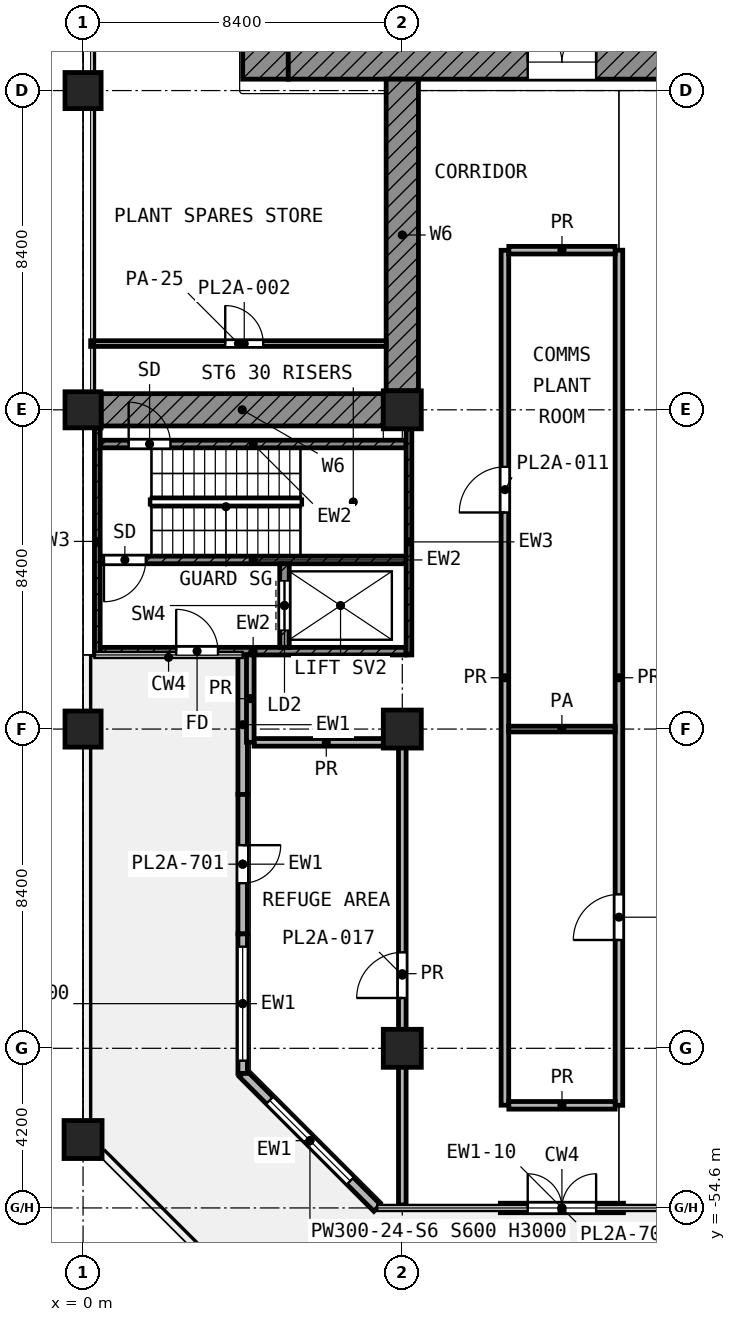
"""IFC4 building model, lengths in metres.
Left out: names, types, materials, properties, quantities, classifications, styles, units other than length and angle.
Written with IfcOpenShell. Run it as: python <this file> out.ifc"""

import sys

from ifc_helpers import new_model, si_unit, direction, frame, frame_2d, origin, origin_2d, place, context, subcontext, project, spatial, rectangle, extrude, element, fill, save


model = new_model("IFC4")
c1 = context("Model", 3, precision=1e-05, world=origin(), true_north=direction((0.0, 1.0)))
c2 = subcontext(c1, "Body", "Model", "MODEL_VIEW")
j1 = project(units=[si_unit("LENGTHUNIT", "METRE"), si_unit("PLANEANGLEUNIT", "RADIAN")], contexts=[c1])
p1 = place(None, origin())
s1 = spatial("IfcSite", under=j1, at=p1, CompositionType="ELEMENT")
p2 = place(p1, origin())
s2 = spatial("IfcBuilding", under=s1, at=p2, CompositionType="ELEMENT")
p3 = place(p2, frame((0.0, 0.0, 153.4)))
s3 = spatial("IfcBuildingStorey", under=s2, at=p3, CompositionType="ELEMENT", Elevation=153.4)
for number, where, z_axis, x_axis in (
    (1, (0.0, -25.2, 0.0), (0.0, 0.0, 1.0), (1.0, 0.0, 0.0)),
    (2, (0.0, -33.6, 0.0), (0.0, 0.0, 1.0), (1.0, 0.0, 0.0)),
):
    element("IfcColumn", number, at=place(p3, frame(where, z_axis=z_axis, x_axis=x_axis)), inside=s3, PredefinedType="COLUMN", context=c2, shape_type="SweptSolid", body=[
        extrude(rectangle(XDim=0.95, YDim=0.95, at=origin_2d()), origin(), (0.0, 0.0, 1.0), 5.0),
    ])
p4 = place(p3, frame((8.4, -33.6, 0.0), z_axis=(0.0, 0.0, 1.0), x_axis=(1.0, 0.0, 0.0)))
e3 = element("IfcColumn", 3, at=p4, inside=s3, PredefinedType="COLUMN", context=c2, shape_type="SweptSolid", body=[
    extrude(rectangle(XDim=1.0, YDim=1.0, at=origin_2d()), origin(), (0.0, 0.0, 1.0), 5.0),
])
p5 = place(p3, frame((0.0, -42.0, 0.0), z_axis=(0.0, 0.0, 1.0), x_axis=(1.0, 0.0, 0.0)))
e4 = element("IfcColumn", 4, at=p5, inside=s3, PredefinedType="COLUMN", context=c2, shape_type="SweptSolid", body=[
    extrude(rectangle(XDim=0.95, YDim=0.95, at=origin_2d()), origin(), (0.0, 0.0, 1.0), 5.0),
])
for number, where, z_axis, x_axis in (
    (5, (8.4, -42.0, 0.0), (0.0, 0.0, 1.0), (1.0, 0.0, 0.0)),
    (6, (8.4, -50.4, 0.0), (0.0, 0.0, 1.0), (1.0, 0.0, 0.0)),
    (7, (0.0, -52.8, 0.0), (0.0, 0.0, 1.0), (1.0, 0.0, 0.0)),
):
    element("IfcColumn", number, at=place(p3, frame(where, z_axis=z_axis, x_axis=x_axis)), inside=s3, PredefinedType="COLUMN", context=c2, shape_type="SweptSolid", body=[
        extrude(rectangle(XDim=1.0, YDim=1.0, at=origin_2d()), origin(), (0.0, 0.0, 1.0), 5.0),
    ])
p6 = place(p3, frame((8.4, -24.9, 0.0), z_axis=(0.0, 0.0, 1.0), x_axis=(0.0, -1.0, 0.0)))
e8 = element("IfcWall", 8, at=p6, inside=s3, PredefinedType="SHEAR", context=c2, shape_type="SweptSolid", body=[
    extrude(rectangle(XDim=8.2, YDim=0.85, at=frame_2d((4.1, 0.0))), origin(), (0.0, 0.0, 1.0), 4.4),
])
p7 = place(p3, frame((0.475, -33.6, 0.0), z_axis=(0.0, 0.0, 1.0), x_axis=(1.0, 0.0, 0.0)))
e9 = element("IfcWall", 9, at=p7, inside=s3, PredefinedType="SHEAR", context=c2, shape_type="SweptSolid", body=[
    extrude(rectangle(XDim=7.425, YDim=0.85, at=frame_2d((3.712, 0.0))), origin(), (0.0, 0.0, 1.0), 4.4),
])
p8 = place(p3, frame((4.2, -40.05, 0.0), z_axis=(0.0, 0.0, 1.0), x_axis=(0.0, -1.0, 0.0)))
e10 = element("IfcWall", 10, at=p8, inside=s3, PredefinedType="SOLIDWALL", context=c2, shape_type="SweptSolid", body=[
    extrude(rectangle(XDim=3.67, YDim=0.25, at=frame_2d((1.835, 0.0))), origin(), (0.0, 0.0, 1.0), 4.4),
])
p9 = place(p3, frame((4.2, -43.72, 0.0), z_axis=(0.0, 0.0, 1.0), x_axis=(0.0, -1.0, 0.0)))
e11 = element("IfcWall", 11, at=p9, inside=s3, PredefinedType="SOLIDWALL", context=c2, shape_type="SweptSolid", body=[
    extrude(rectangle(XDim=3.67, YDim=0.25, at=frame_2d((1.835, 0.0))), origin(), (0.0, 0.0, 1.0), 4.4),
])
p10 = place(p9, frame((1.335, 0.0, 0.0)))
e12 = element("IfcOpeningElement", 12, at=p10, cuts=e11, PredefinedType="OPENING", context=c2, shape_type="SweptSolid", body=[
    extrude(rectangle(XDim=1.0, YDim=2.1, at=frame_2d((0.5, 1.05))), frame((0.0, 0.135, 0.0), z_axis=(0.0, -1.0, 0.0), x_axis=(1.0, 0.0, 0.0)), (0.0, 0.0, 1.0), 0.27),
])
p11 = place(p3, frame((4.2, -47.39, 0.0), z_axis=(0.0, 0.0, 1.0), x_axis=(0.0, -1.0, 0.0)))
e13 = element("IfcWall", 13, at=p11, inside=s3, PredefinedType="SOLIDWALL", context=c2, shape_type="SweptSolid", body=[
    extrude(rectangle(XDim=3.67, YDim=0.25, at=frame_2d((1.835, 0.0))), origin(), (0.0, 0.0, 1.0), 4.4),
])
p12 = place(p11, frame((0.335, 0.0, 0.6)))
e14 = element("IfcOpeningElement", 14, at=p12, cuts=e13, PredefinedType="OPENING", context=c2, shape_type="SweptSolid", body=[
    extrude(rectangle(XDim=3.0, YDim=2.4, at=frame_2d((1.5, 1.2))), frame((0.0, 0.135, 0.0), z_axis=(0.0, -1.0, 0.0), x_axis=(1.0, 0.0, 0.0)), (0.0, 0.0, 1.0), 0.27),
])
p13 = place(p3, frame((4.2, -51.06, 0.0), z_axis=(0.0, 0.0, 1.0), x_axis=(0.707106781187, -0.707106781187, 0.0)))
e15 = element("IfcWall", 15, at=p13, inside=s3, PredefinedType="SOLIDWALL", context=c2, shape_type="SweptSolid", body=[
    extrude(rectangle(XDim=5.006, YDim=0.25, at=frame_2d((2.503, 0.0))), origin(), (0.0, 0.0, 1.0), 4.4),
])
p14 = place(p13, frame((1.003, 0.0, 0.6)))
e16 = element("IfcOpeningElement", 16, at=p14, cuts=e15, PredefinedType="OPENING", context=c2, shape_type="SweptSolid", body=[
    extrude(rectangle(XDim=3.0, YDim=2.4, at=frame_2d((1.5, 1.2))), frame((0.0, 0.135, 0.0), z_axis=(0.0, -1.0, 0.0), x_axis=(1.0, 0.0, 0.0)), (0.0, 0.0, 1.0), 0.27),
])
p15 = place(p3, frame((10.98, -54.601, 0.0), z_axis=(0.0, 0.0, 1.0), x_axis=(1.0, 0.0, 0.0)))
e17 = element("IfcWall", 17, at=p15, inside=s3, PredefinedType="SOLIDWALL", context=c2, shape_type="SweptSolid", body=[
    extrude(rectangle(XDim=3.24, YDim=0.25, at=frame_2d((1.62, 0.0))), origin(), (0.0, 0.0, 1.0), 4.24),
])
p16 = place(p15, frame((0.72, 0.0, 0.0)))
e18 = element("IfcOpeningElement", 18, at=p16, cuts=e17, PredefinedType="OPENING", context=c2, shape_type="SweptSolid", body=[
    extrude(rectangle(XDim=1.8, YDim=2.1, at=frame_2d((0.9, 1.05))), frame((0.0, 0.135, 0.0), z_axis=(0.0, -1.0, 0.0), x_axis=(1.0, 0.0, 0.0)), (0.0, 0.0, 1.0), 0.27),
])
p17 = place(p3, frame((4.8, -24.9, 0.0), z_axis=(0.0, 0.0, 1.0), x_axis=(0.0, 1.0, 0.0)))
e19 = element("IfcWall", 19, at=p17, inside=s3, PredefinedType="SHEAR", context=c2, shape_type="SweptSolid", body=[
    extrude(rectangle(XDim=19.5, YDim=1.2, at=frame_2d((9.75, 0.0))), origin(), (0.0, 0.0, 1.0), 4.4),
])
p18 = place(p17, frame((11.35, 0.0, 0.0)))
e20 = element("IfcOpeningElement", 20, at=p18, cuts=e19, PredefinedType="OPENING", context=c2, shape_type="SweptSolid", body=[
    extrude(rectangle(XDim=1.1, YDim=2.1, at=frame_2d((0.55, 1.05))), frame((0.0, 0.61, 0.0), z_axis=(0.0, -1.0, 0.0), x_axis=(1.0, 0.0, 0.0)), (0.0, 0.0, 1.0), 1.22),
])
p19 = place(p17, frame((2.05, 0.0, 0.0)))
e21 = element("IfcOpeningElement", 21, at=p19, cuts=e19, PredefinedType="OPENING", context=c2, shape_type="SweptSolid", body=[
    extrude(rectangle(XDim=1.1, YDim=2.1, at=frame_2d((0.55, 1.05))), frame((0.0, 0.61, 0.0), z_axis=(0.0, -1.0, 0.0), x_axis=(1.0, 0.0, 0.0)), (0.0, 0.0, 1.0), 1.22),
])
p20 = place(p3, frame((5.4, -24.45, 0.0), z_axis=(0.0, 0.0, 1.0), x_axis=(1.0, 0.0, 0.0)))
e22 = element("IfcWall", 22, at=p20, inside=s3, PredefinedType="SHEAR", context=c2, shape_type="SweptSolid", body=[
    extrude(rectangle(XDim=18.6, YDim=0.9, at=frame_2d((9.3, 0.0))), origin(), (0.0, 0.0, 1.0), 4.4),
])
p21 = place(p20, frame((6.3, 0.0, 0.0)))
e23 = element("IfcOpeningElement", 23, at=p21, cuts=e22, PredefinedType="OPENING", context=c2, shape_type="SweptSolid", body=[
    extrude(rectangle(XDim=1.8, YDim=2.1, at=frame_2d((0.9, 1.05))), frame((0.0, 0.46, 0.0), z_axis=(0.0, -1.0, 0.0), x_axis=(1.0, 0.0, 0.0)), (0.0, 0.0, 1.0), 0.92),
])
p22 = place(p3, frame((0.375, -40.05, 0.0), z_axis=(0.0, 0.0, 1.0), x_axis=(0.0, 1.0, 0.0)))
e24 = element("IfcWall", 24, at=p22, inside=s3, PredefinedType="SHEAR", context=c2, shape_type="SweptSolid", body=[
    extrude(rectangle(XDim=5.975, YDim=0.15, at=frame_2d((2.988, 0.0))), origin(), (0.0, 0.0, 1.0), 4.4),
])
p23 = place(p3, frame((8.575, -40.05, 0.0), z_axis=(0.0, 0.0, 1.0), x_axis=(0.0, 1.0, 0.0)))
e25 = element("IfcWall", 25, at=p23, inside=s3, PredefinedType="SHEAR", context=c2, shape_type="SweptSolid", body=[
    extrude(rectangle(XDim=5.95, YDim=0.15, at=frame_2d((2.975, 0.0))), origin(), (0.0, 0.0, 1.0), 4.4),
])
p24 = place(p3, frame((0.45, -34.5, 0.0), z_axis=(0.0, 0.0, 1.0), x_axis=(1.0, 0.0, 0.0)))
e26 = element("IfcWall", 26, at=p24, inside=s3, PredefinedType="SHEAR", context=c2, shape_type="SweptSolid", body=[
    extrude(rectangle(XDim=8.05, YDim=0.2, at=frame_2d((4.025, 0.0))), origin(), (0.0, 0.0, 1.0), 4.4),
])
p25 = place(p24, frame((0.75, 0.0, 0.0)))
e27 = element("IfcOpeningElement", 27, at=p25, cuts=e26, PredefinedType="OPENING", context=c2, shape_type="SweptSolid", body=[
    extrude(rectangle(XDim=1.1, YDim=2.1, at=frame_2d((0.55, 1.05))), frame((0.0, 0.11, 0.0), z_axis=(0.0, -1.0, 0.0), x_axis=(1.0, 0.0, 0.0)), (0.0, 0.0, 1.0), 0.22),
])
p26 = place(p3, frame((0.45, -37.55, 0.0), z_axis=(0.0, 0.0, 1.0), x_axis=(1.0, 0.0, 0.0)))
e28 = element("IfcWall", 28, at=p26, inside=s3, PredefinedType="SHEAR", context=c2, shape_type="SweptSolid", body=[
    extrude(rectangle(XDim=8.05, YDim=0.2, at=frame_2d((4.025, 0.0))), origin(), (0.0, 0.0, 1.0), 4.4),
])
p27 = place(p26, frame((0.1, 0.0, 0.0)))
e29 = element("IfcOpeningElement", 29, at=p27, cuts=e28, PredefinedType="OPENING", context=c2, shape_type="SweptSolid", body=[
    extrude(rectangle(XDim=1.1, YDim=2.1, at=frame_2d((0.55, 1.05))), frame((0.0, 0.11, 0.0), z_axis=(0.0, -1.0, 0.0), x_axis=(1.0, 0.0, 0.0)), (0.0, 0.0, 1.0), 0.22),
])
p28 = place(p3, frame((0.45, -39.95, 0.0), z_axis=(0.0, 0.0, 1.0), x_axis=(1.0, 0.0, 0.0)))
e30 = element("IfcWall", 30, at=p28, inside=s3, PredefinedType="SHEAR", context=c2, shape_type="SweptSolid", body=[
    extrude(rectangle(XDim=8.05, YDim=0.2, at=frame_2d((4.025, 0.0))), origin(), (0.0, 0.0, 1.0), 4.4),
])
p29 = place(p28, frame((2.0, 0.0, 0.0)))
e31 = element("IfcOpeningElement", 31, at=p29, cuts=e30, PredefinedType="OPENING", context=c2, shape_type="SweptSolid", body=[
    extrude(rectangle(XDim=1.1, YDim=2.1, at=frame_2d((0.55, 1.05))), frame((0.0, 0.11, 0.0), z_axis=(0.0, -1.0, 0.0), x_axis=(1.0, 0.0, 0.0)), (0.0, 0.0, 1.0), 0.22),
])
p30 = place(p3, frame((5.3, -39.85, 0.0), z_axis=(0.0, 0.0, 1.0), x_axis=(0.0, 1.0, 0.0)))
e32 = element("IfcWall", 32, at=p30, inside=s3, PredefinedType="SHEAR", context=c2, shape_type="SweptSolid", body=[
    extrude(rectangle(XDim=2.2, YDim=0.25, at=frame_2d((1.1, 0.0))), origin(), (0.0, 0.0, 1.0), 4.4),
])
p31 = place(p30, frame((0.45, 0.0, 0.0)))
e33 = element("IfcOpeningElement", 33, at=p31, cuts=e32, PredefinedType="OPENING", context=c2, shape_type="SweptSolid", body=[
    extrude(rectangle(XDim=1.3, YDim=2.1, at=frame_2d((0.65, 1.05))), frame((0.0, 0.135, 0.0), z_axis=(0.0, -1.0, 0.0), x_axis=(1.0, 0.0, 0.0)), (0.0, 0.0, 1.0), 0.27),
])
p32 = place(p3, frame((11.2, -42.0, 0.0), z_axis=(0.0, 0.0, 1.0), x_axis=(1.0, 0.0, 0.0)))
e34 = element("IfcWall", 34, at=p32, inside=s3, PredefinedType="PARTITIONING", context=c2, shape_type="SweptSolid", body=[
    extrude(rectangle(XDim=2.8, YDim=0.15, at=frame_2d((1.4, 0.0))), origin(), (0.0, 0.0, 1.0), 4.4),
])
p33 = place(p3, frame((0.2, -31.857, 0.0), z_axis=(0.0, 0.0, 1.0), x_axis=(1.0, 0.0, 0.0)))
e35 = element("IfcWall", 35, at=p33, inside=s3, PredefinedType="PARTITIONING", context=c2, shape_type="SweptSolid", body=[
    extrude(rectangle(XDim=7.776, YDim=0.15, at=frame_2d((3.888, 0.0))), origin(), (0.0, 0.0, 1.0), 3.1),
])
p34 = place(p33, frame((3.541, 0.0, 0.0)))
e36 = element("IfcOpeningElement", 36, at=p34, cuts=e35, PredefinedType="OPENING", context=c2, shape_type="SweptSolid", body=[
    extrude(rectangle(XDim=1.0, YDim=2.1, at=frame_2d((0.5, 1.05))), frame((0.0, 0.085, 0.0), z_axis=(0.0, -1.0, 0.0), x_axis=(1.0, 0.0, 0.0)), (0.0, 0.0, 1.0), 0.17),
])
p35 = place(p3, frame((11.203, -51.9, 0.0), z_axis=(0.0, 0.0, 1.0), x_axis=(1.0, 0.0, 0.0)))
e37 = element("IfcWall", 37, at=p35, inside=s3, PredefinedType="PARTITIONING", context=c2, shape_type="SweptSolid", body=[
    extrude(rectangle(XDim=2.797, YDim=0.2, at=frame_2d((1.398, 0.0))), origin(), (0.0, 0.0, 1.0), 4.4),
])
p36 = place(p3, frame((4.501, -42.35, 0.0), z_axis=(0.0, 0.0, 1.0), x_axis=(1.0, 0.0, 0.0)))
e38 = element("IfcWall", 38, at=p36, inside=s3, PredefinedType="PARTITIONING", context=c2, shape_type="SweptSolid", body=[
    extrude(rectangle(XDim=3.797, YDim=0.2, at=frame_2d((1.898, 0.0))), origin(), (0.0, 0.0, 1.0), 4.4),
])
p37 = place(p3, frame((11.203, -29.4, 0.0), z_axis=(0.0, 0.0, 1.0), x_axis=(1.0, 0.0, 0.0)))
e39 = element("IfcWall", 39, at=p37, inside=s3, PredefinedType="PARTITIONING", context=c2, shape_type="SweptSolid", body=[
    extrude(rectangle(XDim=2.797, YDim=0.2, at=frame_2d((1.398, 0.0))), origin(), (0.0, 0.0, 1.0), 4.4),
])
p38 = place(p3, frame((4.4, -42.348, 0.0), z_axis=(0.0, 0.0, 1.0), x_axis=(0.0, 1.0, 0.0)))
e40 = element("IfcWall", 40, at=p38, inside=s3, PredefinedType="PARTITIONING", context=c2, shape_type="SweptSolid", body=[
    extrude(rectangle(XDim=2.297, YDim=0.2, at=frame_2d((1.148, 0.0))), origin(), (0.0, 0.0, 1.0), 4.4),
])
p39 = place(p3, frame((8.4, -54.521, 0.0), z_axis=(0.0, 0.0, 1.0), x_axis=(0.0, 1.0, 0.0)))
e41 = element("IfcWall", 41, at=p39, inside=s3, PredefinedType="PARTITIONING", context=c2, shape_type="SweptSolid", body=[
    extrude(rectangle(XDim=12.17, YDim=0.2, at=frame_2d((6.085, 0.0))), origin(), (0.0, 0.0, 1.0), 4.4),
])
p40 = place(p39, frame((5.445, 0.0, 0.0)))
e42 = element("IfcOpeningElement", 42, at=p40, cuts=e41, PredefinedType="OPENING", context=c2, shape_type="SweptSolid", body=[
    extrude(rectangle(XDim=1.2, YDim=2.1, at=frame_2d((0.6, 1.05))), frame((0.0, 0.11, 0.0), z_axis=(0.0, -1.0, 0.0), x_axis=(1.0, 0.0, 0.0)), (0.0, 0.0, 1.0), 0.22),
])
p41 = place(p3, frame((11.1, -51.897, 0.0), z_axis=(0.0, 0.0, 1.0), x_axis=(0.0, 1.0, 0.0)))
e43 = element("IfcWall", 43, at=p41, inside=s3, PredefinedType="PARTITIONING", context=c2, shape_type="SweptSolid", body=[
    extrude(rectangle(XDim=22.494, YDim=0.2, at=frame_2d((11.247, 0.0))), origin(), (0.0, 0.0, 1.0), 4.4),
])
p42 = place(p41, frame((15.596, 0.0, 0.0)))
e44 = element("IfcOpeningElement", 44, at=p42, cuts=e43, PredefinedType="OPENING", context=c2, shape_type="SweptSolid", body=[
    extrude(rectangle(XDim=1.2, YDim=2.1, at=frame_2d((0.6, 1.05))), frame((0.0, 0.11, 0.0), z_axis=(0.0, -1.0, 0.0), x_axis=(1.0, 0.0, 0.0)), (0.0, 0.0, 1.0), 0.22),
])
p43 = place(p3, frame((14.1, -51.9, 0.0), z_axis=(0.0, 0.0, 1.0), x_axis=(0.0, 1.0, 0.0)))
e45 = element("IfcWall", 45, at=p43, inside=s3, PredefinedType="PARTITIONING", context=c2, shape_type="SweptSolid", body=[
    extrude(rectangle(XDim=22.5, YDim=0.2, at=frame_2d((11.25, 0.0))), origin(), (0.0, 0.0, 1.0), 4.4),
])
p44 = place(p43, frame((4.35, 0.0, 0.0)))
e46 = element("IfcOpeningElement", 46, at=p44, cuts=e45, PredefinedType="OPENING", context=c2, shape_type="SweptSolid", body=[
    extrude(rectangle(XDim=1.2, YDim=2.1, at=frame_2d((0.6, 1.05))), frame((0.0, 0.11, 0.0), z_axis=(0.0, -1.0, 0.0), x_axis=(1.0, 0.0, 0.0)), (0.0, 0.0, 1.0), 0.22),
])
p45 = place(p10, origin())
e47 = element("IfcDoor", 47, at=p45, inside=s3, OperationType="SINGLE_SWING_LEFT", PredefinedType="DOOR", context=c2, shape_type="SweptSolid", body=[
    extrude(rectangle(XDim=1.0, YDim=2.1, at=frame_2d((0.5, 1.05))), frame((0.0, 0.025, 0.0), z_axis=(0.0, -1.0, 0.0), x_axis=(1.0, 0.0, 0.0)), (0.0, 0.0, 1.0), 0.05),
])
fill(e12, e47)
p46 = place(p12, origin())
e48 = element("IfcWindow", 48, at=p46, inside=s3, PartitioningType="SINGLE_PANEL", PredefinedType="WINDOW", context=c2, shape_type="SweptSolid", body=[
    extrude(rectangle(XDim=3.0, YDim=2.4, at=frame_2d((1.5, 1.2))), frame((0.0, 0.03, 0.0), z_axis=(0.0, -1.0, 0.0), x_axis=(1.0, 0.0, 0.0)), (0.0, 0.0, 1.0), 0.06),
])
fill(e14, e48)
p47 = place(p14, origin())
e49 = element("IfcWindow", 49, at=p47, inside=s3, PartitioningType="SINGLE_PANEL", PredefinedType="WINDOW", context=c2, shape_type="SweptSolid", body=[
    extrude(rectangle(XDim=3.0, YDim=2.4, at=frame_2d((1.5, 1.2))), frame((0.0, 0.03, 0.0), z_axis=(0.0, -1.0, 0.0), x_axis=(1.0, 0.0, 0.0)), (0.0, 0.0, 1.0), 0.06),
])
fill(e16, e49)
p48 = place(p16, origin())
e50 = element("IfcDoor", 50, at=p48, inside=s3, OperationType="DOUBLE_DOOR_SINGLE_SWING", PredefinedType="DOOR", context=c2, shape_type="SweptSolid", body=[
    extrude(rectangle(XDim=1.8, YDim=2.1, at=frame_2d((0.9, 1.05))), frame((0.0, 0.025, 0.0), z_axis=(0.0, -1.0, 0.0), x_axis=(1.0, 0.0, 0.0)), (0.0, 0.0, 1.0), 0.05),
])
fill(e18, e50)
p49 = place(p21, origin())
e51 = element("IfcDoor", 51, at=p49, inside=s3, OperationType="DOUBLE_DOOR_SINGLE_SWING", PredefinedType="DOOR", context=c2, shape_type="SweptSolid", body=[
    extrude(rectangle(XDim=1.8, YDim=2.1, at=frame_2d((0.9, 1.05))), frame((0.0, 0.025, 0.0), z_axis=(0.0, -1.0, 0.0), x_axis=(1.0, 0.0, 0.0)), (0.0, 0.0, 1.0), 0.05),
])
fill(e23, e51)
p50 = place(p25, origin())
e52 = element("IfcDoor", 52, at=p50, inside=s3, OperationType="SINGLE_SWING_LEFT", PredefinedType="DOOR", context=c2, shape_type="SweptSolid", body=[
    extrude(rectangle(XDim=1.1, YDim=2.1, at=frame_2d((0.55, 1.05))), frame((0.0, 0.025, 0.0), z_axis=(0.0, -1.0, 0.0), x_axis=(1.0, 0.0, 0.0)), (0.0, 0.0, 1.0), 0.05),
])
fill(e27, e52)
p51 = place(p27, frame((1.1, 0.0, 0.0), z_axis=(0.0, 0.0, 1.0), x_axis=(-1.0, 0.0, 0.0)))
e53 = element("IfcDoor", 53, at=p51, inside=s3, OperationType="SINGLE_SWING_LEFT", PredefinedType="DOOR", context=c2, shape_type="SweptSolid", body=[
    extrude(rectangle(XDim=1.1, YDim=2.1, at=frame_2d((0.55, 1.05))), frame((0.0, 0.025, 0.0), z_axis=(0.0, -1.0, 0.0), x_axis=(1.0, 0.0, 0.0)), (0.0, 0.0, 1.0), 0.05),
])
fill(e29, e53)
p52 = place(p31, origin())
e54 = element("IfcDoor", 54, at=p52, inside=s3, OperationType="DOUBLE_DOOR_SLIDING", PredefinedType="DOOR", context=c2, shape_type="SweptSolid", body=[
    extrude(rectangle(XDim=1.3, YDim=2.1, at=frame_2d((0.65, 1.05))), frame((0.0, 0.025, 0.0), z_axis=(0.0, -1.0, 0.0), x_axis=(1.0, 0.0, 0.0)), (0.0, 0.0, 1.0), 0.05),
])
fill(e33, e54)
p53 = place(p29, origin())
e55 = element("IfcDoor", 55, at=p53, inside=s3, OperationType="SINGLE_SWING_LEFT", PredefinedType="DOOR", context=c2, shape_type="SweptSolid", body=[
    extrude(rectangle(XDim=1.1, YDim=2.1, at=frame_2d((0.55, 1.05))), frame((0.0, 0.025, 0.0), z_axis=(0.0, -1.0, 0.0), x_axis=(1.0, 0.0, 0.0)), (0.0, 0.0, 1.0), 0.05),
])
fill(e31, e55)
p54 = place(p40, origin())
e56 = element("IfcDoor", 56, at=p54, inside=s3, OperationType="SINGLE_SWING_LEFT", PredefinedType="DOOR", context=c2, shape_type="SweptSolid", body=[
    extrude(rectangle(XDim=1.2, YDim=2.1, at=frame_2d((0.6, 1.05))), frame((0.0, 0.025, 0.0), z_axis=(0.0, -1.0, 0.0), x_axis=(1.0, 0.0, 0.0)), (0.0, 0.0, 1.0), 0.05),
])
fill(e42, e56)
p55 = place(p42, origin())
e57 = element("IfcDoor", 57, at=p55, inside=s3, OperationType="SINGLE_SWING_LEFT", PredefinedType="DOOR", context=c2, shape_type="SweptSolid", body=[
    extrude(rectangle(XDim=1.2, YDim=2.1, at=frame_2d((0.6, 1.05))), frame((0.0, 0.025, 0.0), z_axis=(0.0, -1.0, 0.0), x_axis=(1.0, 0.0, 0.0)), (0.0, 0.0, 1.0), 0.05),
])
fill(e44, e57)
p56 = place(p44, origin())
e58 = element("IfcDoor", 58, at=p56, inside=s3, OperationType="SINGLE_SWING_LEFT", PredefinedType="DOOR", context=c2, shape_type="SweptSolid", body=[
    extrude(rectangle(XDim=1.2, YDim=2.1, at=frame_2d((0.6, 1.05))), frame((0.0, 0.025, 0.0), z_axis=(0.0, -1.0, 0.0), x_axis=(1.0, 0.0, 0.0)), (0.0, 0.0, 1.0), 0.05),
])
fill(e46, e58)
p57 = place(p34, origin())
e59 = element("IfcDoor", 59, at=p57, inside=s3, OperationType="SINGLE_SWING_LEFT", PredefinedType="DOOR", context=c2, shape_type="SweptSolid", body=[
    extrude(rectangle(XDim=1.0, YDim=2.1, at=frame_2d((0.5, 1.05))), frame((0.0, 0.025, 0.0), z_axis=(0.0, -1.0, 0.0), x_axis=(1.0, 0.0, 0.0)), (0.0, 0.0, 1.0), 0.05),
])
fill(e36, e59)
save(model, sys.argv[1])
